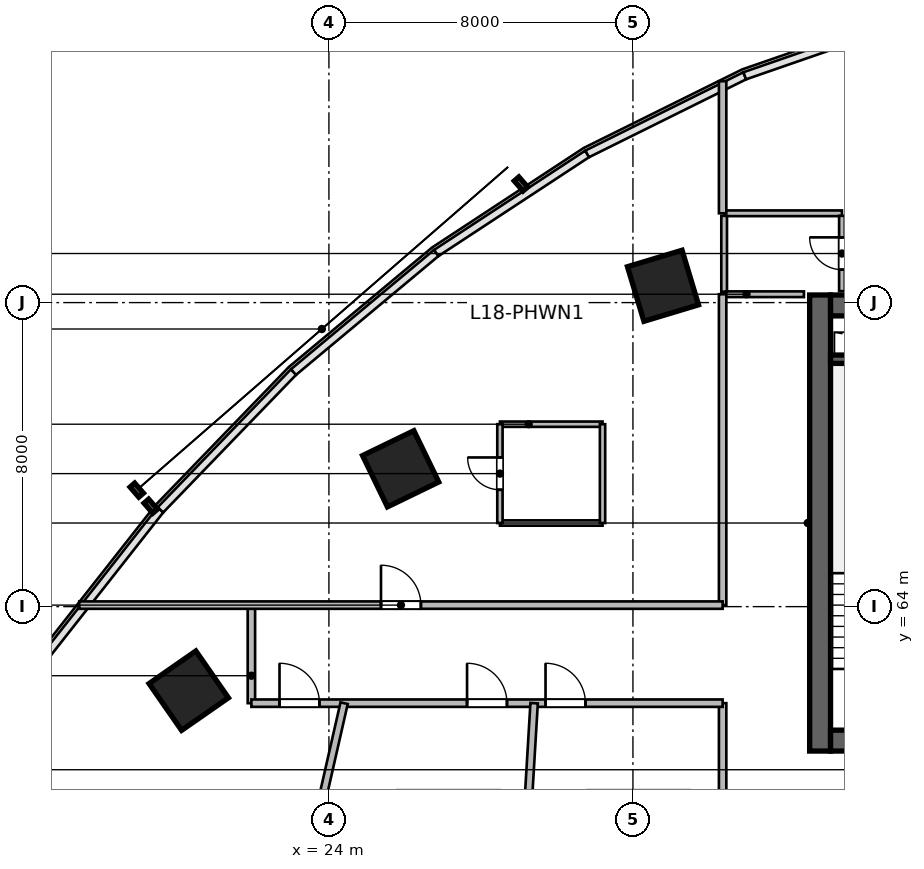
"""IFC4 building model, lengths in metres.
Left out: names, types, materials, properties, quantities, classifications, styles, units other than length and angle.
Written with IfcOpenShell. Run it as: python <this file> out.ifc"""

import sys

from ifc_helpers import new_model, si_unit, direction, frame, frame_2d, origin, origin_2d, place, context, subcontext, project, spatial, rectangle, extrude, source, transform, mapped, element, fill, save


model = new_model("IFC4")
c1 = context("Model", 3, precision=1e-05, world=origin(), true_north=direction((0.0, 1.0)))
c2 = subcontext(c1, "Body", "Model", "MODEL_VIEW")
j1 = project(units=[si_unit("LENGTHUNIT", "METRE"), si_unit("PLANEANGLEUNIT", "RADIAN")], contexts=[c1])
p1 = place(None, origin())
s1 = spatial("IfcSite", under=j1, at=p1, CompositionType="ELEMENT")
p2 = place(p1, origin())
s2 = spatial("IfcBuilding", under=s1, at=p2, CompositionType="ELEMENT")
p3 = place(p2, frame((0.0, 0.0, 78.6)))
s3 = spatial("IfcBuildingStorey", under=s2, at=p3, CompositionType="ELEMENT", Elevation=78.6)
m1 = source(origin(), c2, "Body", "SweptSolid", [
    extrude(rectangle(XDim=12.0, YDim=0.55, at=frame_2d((6.0, 0.0))), origin(), (0.0, 0.0, 1.0), 3.6),
])
p4 = place(p3, frame((36.925, 60.2, 0.0), z_axis=(0.0, 0.0, 1.0), x_axis=(0.0, 1.0, 0.0)))
e1 = element("IfcWall", 1, at=p4, inside=s3, PredefinedType="SHEAR", context=c2, shape_type="MappedRepresentation", body=[
    mapped(m1, transform((0.0, 0.0, 0.0), scale=1.0)),
])
m2 = source(origin(), c2, "Body", "SweptSolid", [
    extrude(rectangle(XDim=21.6, YDim=0.55, at=frame_2d((10.8, 0.0))), origin(), (0.0, 0.0, 1.0), 3.6),
])
p5 = place(p3, frame((37.2, 60.475, 0.0), z_axis=(0.0, 0.0, 1.0), x_axis=(1.0, 0.0, 0.0)))
e2 = element("IfcWall", 2, at=p5, inside=s3, PredefinedType="SHEAR", context=c2, shape_type="MappedRepresentation", body=[
    mapped(m2, transform((0.0, 0.0, 0.0), scale=1.0)),
])
p6 = place(p5, frame((1.1, 0.0, 0.0)))
e3 = element("IfcOpeningElement", 3, at=p6, cuts=e2, PredefinedType="OPENING", context=c2, shape_type="SweptSolid", body=[
    extrude(rectangle(XDim=1.15, YDim=2.15, at=frame_2d((0.575, 1.075))), frame((0.0, 0.285, 0.0), z_axis=(0.0, -1.0, 0.0), x_axis=(1.0, 0.0, 0.0)), (0.0, 0.0, 1.0), 0.57),
])
p7 = place(p5, frame((19.5, 0.0, 0.0)))
e4 = element("IfcOpeningElement", 4, at=p7, cuts=e2, PredefinedType="OPENING", context=c2, shape_type="SweptSolid", body=[
    extrude(rectangle(XDim=0.9, YDim=2.1, at=frame_2d((0.45, 1.05))), frame((0.0, 0.285, 0.0), z_axis=(0.0, -1.0, 0.0), x_axis=(1.0, 0.0, 0.0)), (0.0, 0.0, 1.0), 0.57),
])
p8 = place(p5, frame((12.02, 0.0, 0.0)))
e5 = element("IfcOpeningElement", 5, at=p8, cuts=e2, PredefinedType="OPENING", context=c2, shape_type="SweptSolid", body=[
    extrude(rectangle(XDim=1.6, YDim=2.15, at=frame_2d((0.8, 1.075))), frame((0.0, 0.285, 0.0), z_axis=(0.0, -1.0, 0.0), x_axis=(1.0, 0.0, 0.0)), (0.0, 0.0, 1.0), 0.57),
])
p9 = place(p3, frame((37.2, 71.925, 0.0), z_axis=(0.0, 0.0, 1.0), x_axis=(1.0, 0.0, 0.0)))
e6 = element("IfcWall", 6, at=p9, inside=s3, PredefinedType="SHEAR", context=c2, shape_type="MappedRepresentation", body=[
    mapped(m2, transform((0.0, 0.0, 0.0), scale=1.0)),
])
p10 = place(p9, frame((1.2, 0.0, 0.0)))
e7 = element("IfcOpeningElement", 7, at=p10, cuts=e6, PredefinedType="OPENING", context=c2, shape_type="SweptSolid", body=[
    extrude(rectangle(XDim=0.9, YDim=2.1, at=frame_2d((0.45, 1.05))), frame((0.0, 0.285, 0.0), z_axis=(0.0, -1.0, 0.0), x_axis=(1.0, 0.0, 0.0)), (0.0, 0.0, 1.0), 0.57),
])
p11 = place(p9, frame((14.7, 0.0, 0.0)))
e8 = element("IfcOpeningElement", 8, at=p11, cuts=e6, PredefinedType="OPENING", context=c2, shape_type="SweptSolid", body=[
    extrude(rectangle(XDim=1.2, YDim=2.15, at=frame_2d((0.6, 1.075))), frame((0.0, 0.285, 0.0), z_axis=(0.0, -1.0, 0.0), x_axis=(1.0, 0.0, 0.0)), (0.0, 0.0, 1.0), 0.57),
])
p12 = place(p9, frame((4.15, 0.0, 0.0)))
e9 = element("IfcOpeningElement", 9, at=p12, cuts=e6, PredefinedType="OPENING", context=c2, shape_type="SweptSolid", body=[
    extrude(rectangle(XDim=1.3, YDim=2.15, at=frame_2d((0.65, 1.075))), frame((0.0, 0.285, 0.0), z_axis=(0.0, -1.0, 0.0), x_axis=(1.0, 0.0, 0.0)), (0.0, 0.0, 1.0), 0.57),
])
p13 = place(p9, frame((6.76, 0.0, 0.0)))
e10 = element("IfcOpeningElement", 10, at=p13, cuts=e6, PredefinedType="OPENING", context=c2, shape_type="SweptSolid", body=[
    extrude(rectangle(XDim=0.85, YDim=2.1, at=frame_2d((0.425, 1.05))), frame((0.0, 0.285, 0.0), z_axis=(0.0, -1.0, 0.0), x_axis=(1.0, 0.0, 0.0)), (0.0, 0.0, 1.0), 0.57),
])
p14 = place(p9, frame((8.76, 0.0, 0.0)))
e11 = element("IfcOpeningElement", 11, at=p14, cuts=e6, PredefinedType="OPENING", context=c2, shape_type="SweptSolid", body=[
    extrude(rectangle(XDim=0.85, YDim=2.1, at=frame_2d((0.425, 1.05))), frame((0.0, 0.285, 0.0), z_axis=(0.0, -1.0, 0.0), x_axis=(1.0, 0.0, 0.0)), (0.0, 0.0, 1.0), 0.57),
])
p15 = place(p9, frame((10.725, 0.0, 0.0)))
e12 = element("IfcOpeningElement", 12, at=p15, cuts=e6, PredefinedType="OPENING", context=c2, shape_type="SweptSolid", body=[
    extrude(rectangle(XDim=0.85, YDim=2.1, at=frame_2d((0.425, 1.05))), frame((0.0, 0.285, 0.0), z_axis=(0.0, -1.0, 0.0), x_axis=(1.0, 0.0, 0.0)), (0.0, 0.0, 1.0), 0.57),
])
m3 = source(origin(), c2, "Body", "SweptSolid", [
    extrude(rectangle(XDim=3.27, YDim=0.22, at=frame_2d((1.635, 0.0))), origin(), (0.0, 0.0, 1.0), 3.6),
])
p16 = place(p3, frame((37.2, 70.51, 0.0), z_axis=(0.0, 0.0, 1.0), x_axis=(1.0, 0.0, 0.0)))
e13 = element("IfcWall", 13, at=p16, inside=s3, PredefinedType="SHEAR", context=c2, shape_type="MappedRepresentation", body=[
    mapped(m3, transform((0.0, 0.0, 0.0), scale=1.0)),
])
m4 = source(origin(), c2, "Body", "SweptSolid", [
    extrude(rectangle(XDim=1.5, YDim=1.5, at=origin_2d()), origin(), (0.0, 0.0, 1.0), 3.6),
])
for number, where, z_axis, x_axis in (
    (14, (20.311, 61.789, 0.0), (0.0, 0.0, 1.0), (-0.571, 0.821, 0.0)),
    (15, (25.888, 67.627, 0.0), (0.0, 0.0, 1.0), (-0.436, 0.9, 0.0)),
    (16, (32.791, 72.442, 0.0), (0.0, 0.0, 1.0), (-0.289, 0.957, 0.0)),
):
    element("IfcColumn", number, at=place(p3, frame(where, z_axis=z_axis, x_axis=x_axis)), inside=s3, PredefinedType="COLUMN", context=c2, shape_type="MappedRepresentation", body=[
        mapped(m4, transform((0.0, 0.0, 0.0), scale=1.0)),
    ])
m5 = source(origin(), c2, "Body", "SweptSolid", [
    extrude(rectangle(XDim=2.1, YDim=0.15, at=frame_2d((1.05, 0.0))), origin(), (0.0, 0.0, 1.0), 3.36),
])
p17 = place(p3, frame((34.4, 72.22, 0.0), z_axis=(0.0, 0.0, 1.0), x_axis=(1.0, 0.0, 0.0)))
e17 = element("IfcWall", 17, at=p17, inside=s3, PredefinedType="PARTITIONING", context=c2, shape_type="MappedRepresentation", body=[
    mapped(m5, transform((0.0, 0.0, 0.0), scale=1.0)),
])
m6 = source(origin(), c2, "Body", "SweptSolid", [
    extrude(rectangle(XDim=3.1, YDim=0.15, at=frame_2d((1.55, 0.0))), origin(), (0.0, 0.0, 1.0), 2.729),
])
p18 = place(p3, frame((34.4, 74.35, 0.0), z_axis=(0.0, 0.0, 1.0), x_axis=(1.0, 0.0, 0.0)))
e18 = element("IfcWall", 18, at=p18, inside=s3, PredefinedType="PARTITIONING", context=c2, shape_type="MappedRepresentation", body=[
    mapped(m6, transform((0.0, 0.0, 0.0), scale=1.0)),
])
m7 = source(origin(), c2, "Body", "SweptSolid", [
    extrude(rectangle(XDim=1.995, YDim=0.15, at=frame_2d((0.998, 0.0))), origin(), (0.0, 0.0, 1.0), 3.36),
])
p19 = place(p3, frame((34.4, 72.288, 0.0), z_axis=(0.0, 0.0, 1.0), x_axis=(0.0, 1.0, 0.0)))
e19 = element("IfcWall", 19, at=p19, inside=s3, PredefinedType="PARTITIONING", context=c2, shape_type="MappedRepresentation", body=[
    mapped(m7, transform((0.0, 0.0, 0.0), scale=1.0)),
])
m8 = source(origin(), c2, "Body", "SweptSolid", [
    extrude(rectangle(XDim=1.982, YDim=0.15, at=frame_2d((0.991, 0.0))), origin(), (0.0, 0.0, 1.0), 3.36),
])
p20 = place(p3, frame((37.5, 72.3, 0.0), z_axis=(0.0, 0.0, 1.0), x_axis=(0.0, 1.0, 0.0)))
e20 = element("IfcWall", 20, at=p20, inside=s3, PredefinedType="PARTITIONING", context=c2, shape_type="MappedRepresentation", body=[
    mapped(m8, transform((0.0, 0.0, 0.0), scale=1.0)),
])
p21 = place(p20, frame((0.566, 0.0, 0.0)))
e21 = element("IfcOpeningElement", 21, at=p21, cuts=e20, PredefinedType="OPENING", context=c2, shape_type="SweptSolid", body=[
    extrude(rectangle(XDim=0.85, YDim=2.1, at=frame_2d((0.425, 1.05))), frame((0.0, 0.085, 0.0), z_axis=(0.0, -1.0, 0.0), x_axis=(1.0, 0.0, 0.0)), (0.0, 0.0, 1.0), 0.17),
])
m9 = source(origin(), c2, "Body", "SweptSolid", [
    extrude(rectangle(XDim=2.58, YDim=0.195, at=frame_2d((1.29, 0.0))), origin(), (0.0, 0.0, 1.0), 3.36),
])
p22 = place(p3, frame((21.96, 61.46, 0.0), z_axis=(0.0, 0.0, 1.0), x_axis=(0.0, 1.0, 0.0)))
e22 = element("IfcWall", 22, at=p22, inside=s3, PredefinedType="PARTITIONING", context=c2, shape_type="MappedRepresentation", body=[
    mapped(m9, transform((0.0, 0.0, 0.0), scale=1.0)),
])
m10 = source(origin(), c2, "Body", "SweptSolid", [
    extrude(rectangle(XDim=8.18, YDim=0.195, at=frame_2d((4.09, 0.0))), origin(), (0.0, 0.0, 1.0), 3.36),
])
p23 = place(p3, frame((34.36, 64.04, 0.0), z_axis=(0.0, 0.0, 1.0), x_axis=(0.0, 1.0, 0.0)))
e23 = element("IfcWall", 23, at=p23, inside=s3, PredefinedType="PARTITIONING", context=c2, shape_type="MappedRepresentation", body=[
    mapped(m10, transform((0.0, 0.0, 0.0), scale=1.0)),
])
m11 = source(origin(), c2, "Body", "SweptSolid", [
    extrude(rectangle(XDim=3.474, YDim=0.195, at=frame_2d((1.737, 0.0))), origin(), (0.0, 0.0, 1.0), 3.36),
])
p24 = place(p3, frame((34.36, 74.35, 0.0), z_axis=(0.0, 0.0, 1.0), x_axis=(0.0, 1.0, 0.0)))
e24 = element("IfcWall", 24, at=p24, inside=s3, PredefinedType="PARTITIONING", context=c2, shape_type="MappedRepresentation", body=[
    mapped(m11, transform((0.0, 0.0, 0.0), scale=1.0)),
])
m12 = source(origin(), c2, "Body", "SweptSolid", [
    extrude(rectangle(XDim=16.134, YDim=0.195, at=frame_2d((8.067, 0.0))), origin(), (0.0, 0.0, 1.0), 3.36),
])
p25 = place(p3, frame((34.36, 45.326, 0.0), z_axis=(0.0, 0.0, 1.0), x_axis=(0.0, 1.0, 0.0)))
e25 = element("IfcWall", 25, at=p25, inside=s3, PredefinedType="PARTITIONING", context=c2, shape_type="MappedRepresentation", body=[
    mapped(m12, transform((0.0, 0.0, 0.0), scale=1.0)),
])
m13 = source(origin(), c2, "Body", "SweptSolid", [
    extrude(rectangle(XDim=16.93, YDim=0.195, at=frame_2d((8.465, 0.0))), origin(), (0.0, 0.0, 1.0), 3.36),
])
p26 = place(p3, frame((17.43, 64.04, 0.0), z_axis=(0.0, 0.0, 1.0), x_axis=(1.0, 0.0, 0.0)))
e26 = element("IfcWall", 26, at=p26, inside=s3, PredefinedType="PARTITIONING", context=c2, shape_type="MappedRepresentation", body=[
    mapped(m13, transform((0.0, 0.0, 0.0), scale=1.0)),
])
p27 = place(p26, frame((7.94, 0.0, 0.0)))
e27 = element("IfcOpeningElement", 27, at=p27, cuts=e26, PredefinedType="OPENING", context=c2, shape_type="SweptSolid", body=[
    extrude(rectangle(XDim=1.05, YDim=2.15, at=frame_2d((0.525, 1.075))), frame((0.0, 0.107, 0.0), z_axis=(0.0, -1.0, 0.0), x_axis=(1.0, 0.0, 0.0)), (0.0, 0.0, 1.0), 0.215),
])
m14 = source(origin(), c2, "Body", "SweptSolid", [
    extrude(rectangle(XDim=12.4, YDim=0.195, at=frame_2d((6.2, 0.0))), origin(), (0.0, 0.0, 1.0), 3.36),
])
p28 = place(p3, frame((21.96, 61.46, 0.0), z_axis=(0.0, 0.0, 1.0), x_axis=(1.0, 0.0, 0.0)))
e28 = element("IfcWall", 28, at=p28, inside=s3, PredefinedType="PARTITIONING", context=c2, shape_type="MappedRepresentation", body=[
    mapped(m14, transform((0.0, 0.0, 0.0), scale=1.0)),
])
p29 = place(p28, frame((0.74, 0.0, 0.0)))
e29 = element("IfcOpeningElement", 29, at=p29, cuts=e28, PredefinedType="OPENING", context=c2, shape_type="SweptSolid", body=[
    extrude(rectangle(XDim=1.05, YDim=2.15, at=frame_2d((0.525, 1.075))), frame((0.0, 0.107, 0.0), z_axis=(0.0, -1.0, 0.0), x_axis=(1.0, 0.0, 0.0)), (0.0, 0.0, 1.0), 0.215),
])
p30 = place(p28, frame((5.675, 0.0, 0.0)))
e30 = element("IfcOpeningElement", 30, at=p30, cuts=e28, PredefinedType="OPENING", context=c2, shape_type="SweptSolid", body=[
    extrude(rectangle(XDim=1.05, YDim=2.15, at=frame_2d((0.525, 1.075))), frame((0.0, 0.107, 0.0), z_axis=(0.0, -1.0, 0.0), x_axis=(1.0, 0.0, 0.0)), (0.0, 0.0, 1.0), 0.215),
])
p31 = place(p28, frame((7.74, 0.0, 0.0)))
e31 = element("IfcOpeningElement", 31, at=p31, cuts=e28, PredefinedType="OPENING", context=c2, shape_type="SweptSolid", body=[
    extrude(rectangle(XDim=1.05, YDim=2.15, at=frame_2d((0.525, 1.075))), frame((0.0, 0.107, 0.0), z_axis=(0.0, -1.0, 0.0), x_axis=(1.0, 0.0, 0.0)), (0.0, 0.0, 1.0), 0.215),
])
m15 = source(origin(), c2, "Body", "SweptSolid", [
    extrude(rectangle(XDim=26.476, YDim=0.195, at=frame_2d((13.238, 0.0))), origin(), (0.0, 0.0, 1.0), 2.88),
])
p32 = place(p3, frame((18.52, 35.646, 0.0), z_axis=(0.0, 0.0, 1.0), x_axis=(0.22210613157, 0.975022495289, 0.0)))
e32 = element("IfcWall", 32, at=p32, inside=s3, PredefinedType="PARTITIONING", context=c2, shape_type="MappedRepresentation", body=[
    mapped(m15, transform((0.0, 0.0, 0.0), scale=1.0)),
])
m16 = source(origin(), c2, "Body", "SweptSolid", [
    extrude(rectangle(XDim=24.889, YDim=0.195, at=frame_2d((12.444, 0.0))), origin(), (0.0, 0.0, 1.0), 2.644),
])
p33 = place(p3, frame((27.914, 36.616, 0.0), z_axis=(0.0, 0.0, 1.0), x_axis=(0.059709317989, 0.998215807, 0.0)))
e33 = element("IfcWall", 33, at=p33, inside=s3, PredefinedType="PARTITIONING", context=c2, shape_type="MappedRepresentation", body=[
    mapped(m16, transform((0.0, 0.0, 0.0), scale=1.0)),
])
m17 = source(origin(), c2, "Body", "SweptSolid", [
    extrude(rectangle(XDim=2.7, YDim=0.14, at=frame_2d((1.35, 0.0))), origin(), (0.0, 0.0, 1.0), 3.36),
])
for number, where, z_axis, x_axis in (
    (34, (28.5, 68.8, 0.0), (0.0, 0.0, 1.0), (1.0, 0.0, 0.0)),
    (35, (28.5, 66.2, 0.0), (0.0, 0.0, 1.0), (1.0, 0.0, 0.0)),
):
    element("IfcWall", number, at=place(p3, frame(where, z_axis=z_axis, x_axis=x_axis)), inside=s3, PredefinedType="PARTITIONING", context=c2, shape_type="MappedRepresentation", body=[
        mapped(m17, transform((0.0, 0.0, 0.0), scale=1.0)),
    ])
m18 = source(origin(), c2, "Body", "SweptSolid", [
    extrude(rectangle(XDim=2.6, YDim=0.14, at=frame_2d((1.3, 0.0))), origin(), (0.0, 0.0, 1.0), 3.36),
])
p34 = place(p3, frame((28.5, 66.2, 0.0), z_axis=(0.0, 0.0, 1.0), x_axis=(0.0, 1.0, 0.0)))
e36 = element("IfcWall", 36, at=p34, inside=s3, PredefinedType="PARTITIONING", context=c2, shape_type="MappedRepresentation", body=[
    mapped(m18, transform((0.0, 0.0, 0.0), scale=1.0)),
])
p35 = place(p34, frame((0.875, 0.0, 0.0)))
e37 = element("IfcOpeningElement", 37, at=p35, cuts=e36, PredefinedType="OPENING", context=c2, shape_type="SweptSolid", body=[
    extrude(rectangle(XDim=0.85, YDim=2.05, at=frame_2d((0.425, 1.025))), frame((0.0, 0.08, 0.0), z_axis=(0.0, -1.0, 0.0), x_axis=(1.0, 0.0, 0.0)), (0.0, 0.0, 1.0), 0.16),
])
p36 = place(p3, frame((31.2, 66.2, 0.0), z_axis=(0.0, 0.0, 1.0), x_axis=(0.0, 1.0, 0.0)))
e38 = element("IfcWall", 38, at=p36, inside=s3, PredefinedType="PARTITIONING", context=c2, shape_type="MappedRepresentation", body=[
    mapped(m18, transform((0.0, 0.0, 0.0), scale=1.0)),
])
m19 = source(origin(), c2, "Body", "SweptSolid", [
    extrude(rectangle(XDim=0.85, YDim=2.1, at=frame_2d((0.425, 1.05))), frame((0.0, 0.025, 0.0), z_axis=(0.0, -1.0, 0.0), x_axis=(1.0, 0.0, 0.0)), (0.0, 0.0, 1.0), 0.05),
])
p37 = place(p21, origin())
e39 = element("IfcDoor", 39, at=p37, inside=s3, OperationType="SINGLE_SWING_RIGHT", PredefinedType="DOOR", context=c2, shape_type="MappedRepresentation", body=[
    mapped(m19, transform((0.0, 0.0, 0.0), scale=1.0)),
])
fill(e21, e39)
m20 = source(origin(), c2, "Body", "SweptSolid", [
    extrude(rectangle(XDim=1.05, YDim=2.15, at=frame_2d((0.525, 1.075))), frame((0.0, 0.025, 0.0), z_axis=(0.0, -1.0, 0.0), x_axis=(1.0, 0.0, 0.0)), (0.0, 0.0, 1.0), 0.05),
])
p38 = place(p27, origin())
e40 = element("IfcDoor", 40, at=p38, inside=s3, OperationType="SINGLE_SWING_LEFT", PredefinedType="DOOR", context=c2, shape_type="MappedRepresentation", body=[
    mapped(m20, transform((0.0, 0.0, 0.0), scale=1.0)),
])
fill(e27, e40)
m21 = source(origin(), c2, "Body", "SweptSolid", [
    extrude(rectangle(XDim=0.85, YDim=2.05, at=frame_2d((0.425, 1.025))), frame((0.0, 0.025, 0.0), z_axis=(0.0, -1.0, 0.0), x_axis=(1.0, 0.0, 0.0)), (0.0, 0.0, 1.0), 0.05),
])
p39 = place(p35, origin())
e41 = element("IfcDoor", 41, at=p39, inside=s3, OperationType="SINGLE_SWING_RIGHT", PredefinedType="DOOR", context=c2, shape_type="MappedRepresentation", body=[
    mapped(m21, transform((0.0, 0.0, 0.0), scale=1.0)),
])
fill(e37, e41)
p40 = place(p29, origin())
e42 = element("IfcDoor", 42, at=p40, inside=s3, OperationType="SINGLE_SWING_LEFT", PredefinedType="DOOR", context=c2, shape_type="MappedRepresentation", body=[
    mapped(m20, transform((0.0, 0.0, 0.0), scale=1.0)),
])
fill(e29, e42)
p41 = place(p30, origin())
e43 = element("IfcDoor", 43, at=p41, inside=s3, OperationType="SINGLE_SWING_LEFT", PredefinedType="DOOR", context=c2, shape_type="MappedRepresentation", body=[
    mapped(m20, transform((0.0, 0.0, 0.0), scale=1.0)),
])
fill(e30, e43)
p42 = place(p31, origin())
e44 = element("IfcDoor", 44, at=p42, inside=s3, OperationType="SINGLE_SWING_LEFT", PredefinedType="DOOR", context=c2, shape_type="MappedRepresentation", body=[
    mapped(m20, transform((0.0, 0.0, 0.0), scale=1.0)),
])
fill(e31, e44)
save(model, sys.argv[1])
